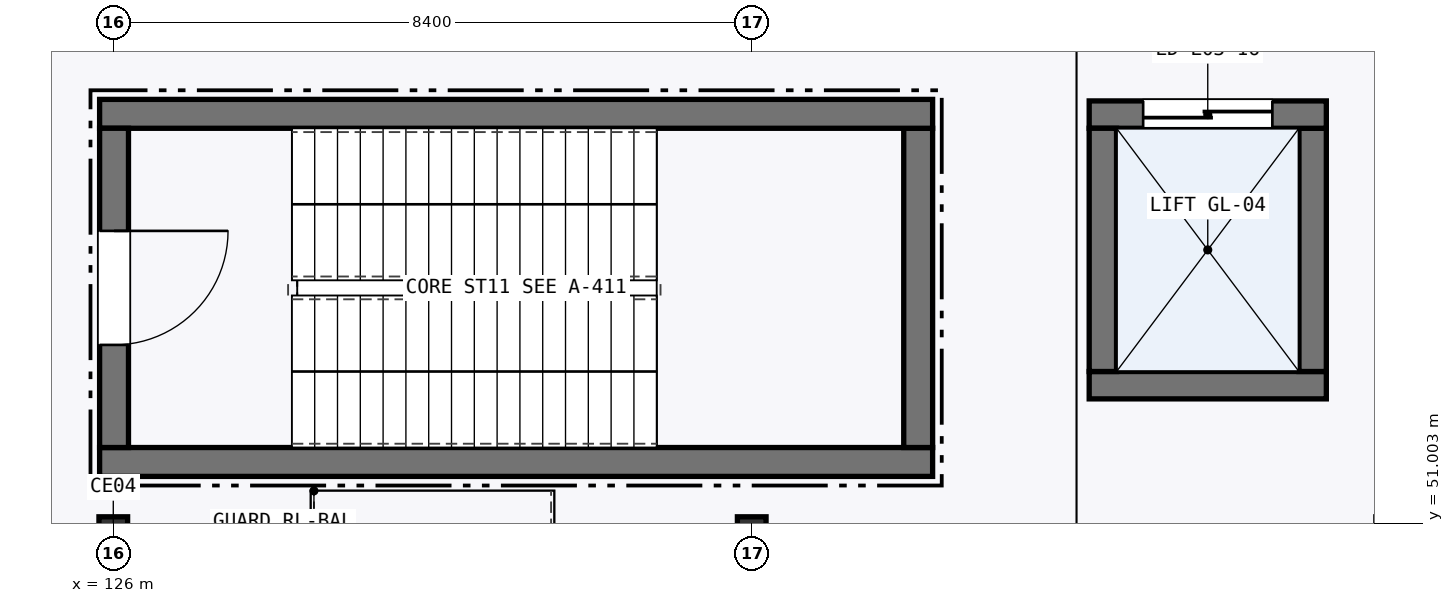
"""IFC4 building model, lengths in metres.
Left out: names, types, materials, properties, quantities, classifications, styles, units other than length and angle.
Written with IfcOpenShell. Run it as: python <this file> out.ifc"""

import sys

from ifc_helpers import new_model, si_unit, direction, frame, frame_2d, origin, origin_2d, place, context, subcontext, project, spatial, rectangle, hollow_circle, extrude, element, fill, save


model = new_model("IFC4")
c1 = context("Model", 3, precision=1e-05, world=origin(), true_north=direction((0.0, 1.0)))
c2 = subcontext(c1, "Body", "Model", "MODEL_VIEW")
j1 = project(units=[si_unit("LENGTHUNIT", "METRE"), si_unit("PLANEANGLEUNIT", "RADIAN")], contexts=[c1])
p1 = place(None, origin())
s1 = spatial("IfcSite", under=j1, at=p1, CompositionType="ELEMENT")
p2 = place(p1, origin())
s2 = spatial("IfcBuilding", under=s1, at=p2, CompositionType="ELEMENT")
p3 = place(p2, frame((0.0, 0.0, 11.4)))
s3 = spatial("IfcBuildingStorey", under=s2, at=p3, CompositionType="ELEMENT", Elevation=11.4)
for number, where, z_axis, x_axis in (
    (1, (126.0, 50.9, 0.0), (0.0, 0.0, 1.0), (1.0, 0.0, 0.0)),
    (2, (134.4, 50.9, 0.0), (0.0, 0.0, 1.0), (1.0, 0.0, 0.0)),
):
    element("IfcColumn", number, at=place(p3, frame(where, z_axis=z_axis, x_axis=x_axis)), inside=s3, PredefinedType="COLUMN", context=c2, shape_type="SweptSolid", body=[
        extrude(hollow_circle(Radius=0.188, WallThickness=0.014, at=origin_2d()), origin(), (0.0, 0.0, 1.0), 5.1),
    ])
p4 = place(p3, frame((125.82, 51.81, 0.0), z_axis=(0.0, 0.0, 1.0), x_axis=(1.0, 0.0, 0.0)))
e3 = element("IfcWall", 3, at=p4, inside=s3, PredefinedType="SHEAR", context=c2, shape_type="SweptSolid", body=[
    extrude(rectangle(XDim=10.96, YDim=0.38, at=frame_2d((5.48, 0.0))), origin(), (0.0, 0.0, 1.0), 4.845),
])
p5 = place(p3, frame((136.59, 52.0, 0.0), z_axis=(0.0, 0.0, 1.0), x_axis=(0.0, 1.0, 0.0)))
e4 = element("IfcWall", 4, at=p5, inside=s3, PredefinedType="SHEAR", context=c2, shape_type="SweptSolid", body=[
    extrude(rectangle(XDim=4.2, YDim=0.38, at=frame_2d((2.1, 0.0))), origin(), (0.0, 0.0, 1.0), 4.845),
])
p6 = place(p3, frame((136.78, 56.39, 0.0), z_axis=(0.0, 0.0, 1.0), x_axis=(-1.0, 0.0, 0.0)))
e5 = element("IfcWall", 5, at=p6, inside=s3, PredefinedType="SHEAR", context=c2, shape_type="SweptSolid", body=[
    extrude(rectangle(XDim=10.96, YDim=0.38, at=frame_2d((5.48, 0.0))), origin(), (0.0, 0.0, 1.0), 4.845),
])
p7 = place(p3, frame((126.01, 56.2, 0.0), z_axis=(0.0, 0.0, 1.0), x_axis=(0.0, -1.0, 0.0)))
e6 = element("IfcWall", 6, at=p7, inside=s3, PredefinedType="SHEAR", context=c2, shape_type="SweptSolid", body=[
    extrude(rectangle(XDim=4.2, YDim=0.38, at=frame_2d((2.1, 0.0))), origin(), (0.0, 0.0, 1.0), 4.845),
])
p8 = place(p7, frame((1.35, 0.0, 0.0)))
e7 = element("IfcOpeningElement", 7, at=p8, cuts=e6, PredefinedType="OPENING", context=c2, shape_type="SweptSolid", body=[
    extrude(rectangle(XDim=1.5, YDim=2.15, at=frame_2d((0.75, 1.075))), frame((0.0, 0.2, 0.0), z_axis=(0.0, -1.0, 0.0), x_axis=(1.0, 0.0, 0.0)), (0.0, 0.0, 1.0), 0.4),
])
p9 = place(p3, frame((138.84, 52.82, 0.0), z_axis=(0.0, 0.0, 1.0), x_axis=(1.0, 0.0, 0.0)))
e8 = element("IfcWall", 8, at=p9, inside=s3, PredefinedType="SHEAR", context=c2, shape_type="SweptSolid", body=[
    extrude(rectangle(XDim=3.12, YDim=0.36, at=frame_2d((1.56, 0.0))), origin(), (0.0, 0.0, 1.0), 4.845),
])
p10 = place(p3, frame((141.78, 53.0, 0.0), z_axis=(0.0, 0.0, 1.0), x_axis=(0.0, 1.0, 0.0)))
e9 = element("IfcWall", 9, at=p10, inside=s3, PredefinedType="SHEAR", context=c2, shape_type="SweptSolid", body=[
    extrude(rectangle(XDim=3.2, YDim=0.36, at=frame_2d((1.6, 0.0))), origin(), (0.0, 0.0, 1.0), 4.845),
])
p11 = place(p3, frame((141.96, 56.38, 0.0), z_axis=(0.0, 0.0, 1.0), x_axis=(-1.0, 0.0, 0.0)))
e10 = element("IfcWall", 10, at=p11, inside=s3, PredefinedType="SHEAR", context=c2, shape_type="SweptSolid", body=[
    extrude(rectangle(XDim=3.12, YDim=0.36, at=frame_2d((1.56, 0.0))), origin(), (0.0, 0.0, 1.0), 4.845),
])
p12 = place(p11, frame((0.71, 0.0, 0.0)))
e11 = element("IfcOpeningElement", 11, at=p12, cuts=e10, PredefinedType="OPENING", context=c2, shape_type="SweptSolid", body=[
    extrude(rectangle(XDim=1.7, YDim=2.3, at=frame_2d((0.85, 1.15))), frame((0.0, 0.19, 0.0), z_axis=(0.0, -1.0, 0.0), x_axis=(1.0, 0.0, 0.0)), (0.0, 0.0, 1.0), 0.38),
])
p13 = place(p3, frame((139.02, 56.2, 0.0), z_axis=(0.0, 0.0, 1.0), x_axis=(0.0, -1.0, 0.0)))
e12 = element("IfcWall", 12, at=p13, inside=s3, PredefinedType="SHEAR", context=c2, shape_type="SweptSolid", body=[
    extrude(rectangle(XDim=3.2, YDim=0.36, at=frame_2d((1.6, 0.0))), origin(), (0.0, 0.0, 1.0), 4.845),
])
p14 = place(p8, origin())
e13 = element("IfcDoor", 13, at=p14, inside=s3, OperationType="SINGLE_SWING_LEFT", PredefinedType="DOOR", context=c2, shape_type="SweptSolid", body=[
    extrude(rectangle(XDim=1.5, YDim=2.15, at=frame_2d((0.75, 1.075))), frame((0.0, 0.025, 0.0), z_axis=(0.0, -1.0, 0.0), x_axis=(1.0, 0.0, 0.0)), (0.0, 0.0, 1.0), 0.05),
])
fill(e7, e13)
p15 = place(p12, frame((1.7, 0.0, 0.0), z_axis=(0.0, 0.0, 1.0), x_axis=(-1.0, 0.0, 0.0)))
e14 = element("IfcDoor", 14, at=p15, inside=s3, OperationType="DOUBLE_DOOR_SLIDING", PredefinedType="DOOR", context=c2, shape_type="SweptSolid", body=[
    extrude(rectangle(XDim=1.7, YDim=2.3, at=frame_2d((0.85, 1.15))), frame((0.0, 0.025, 0.0), z_axis=(0.0, -1.0, 0.0), x_axis=(1.0, 0.0, 0.0)), (0.0, 0.0, 1.0), 0.05),
])
fill(e11, e14)
save(model, sys.argv[1])
